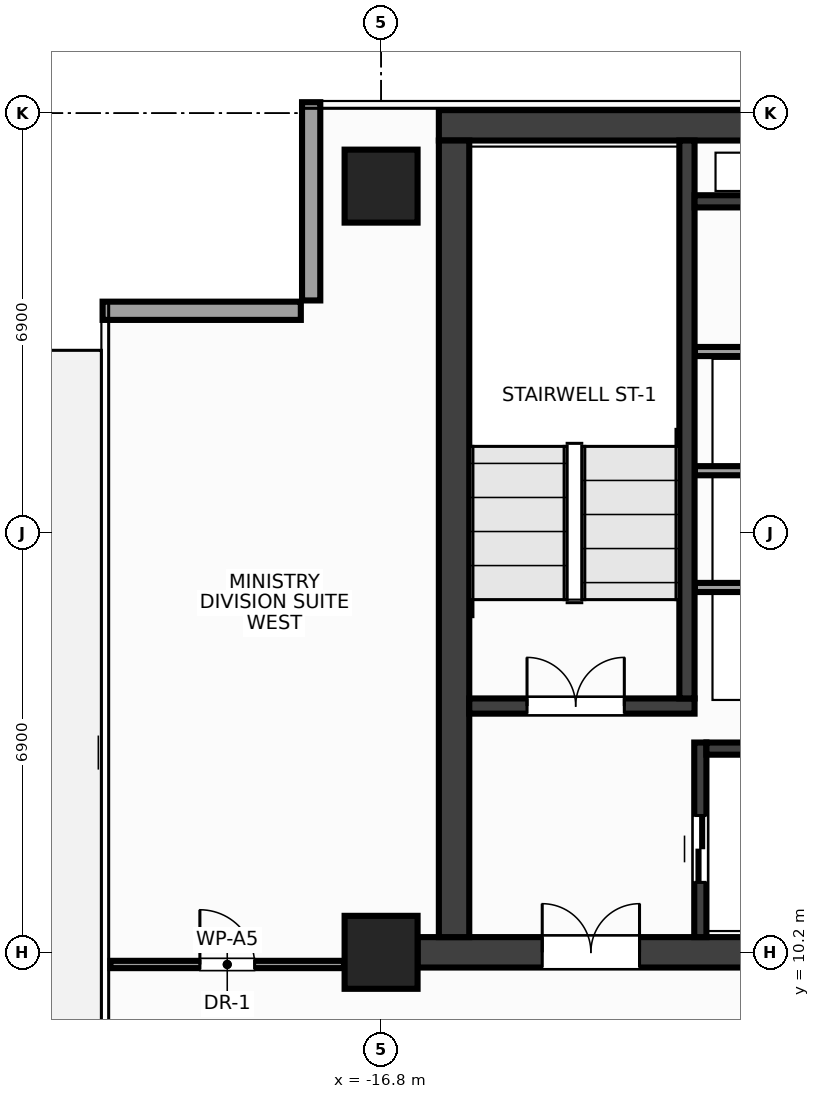
"""IFC4 building model, lengths in metres.
Left out: names, types, materials, properties, quantities, classifications, styles, units other than length and angle.
Written with IfcOpenShell. Run it as: python <this file> out.ifc"""

import sys

from ifc_helpers import new_model, si_unit, direction, frame, frame_2d, origin, origin_2d, place, context, subcontext, project, spatial, rectangle, extrude, source, transform, mapped, element, fill, save


model = new_model("IFC4")
c1 = context("Model", 3, precision=1e-05, world=origin(), true_north=direction((0.0, 1.0)))
c2 = subcontext(c1, "Body", "Model", "MODEL_VIEW")
j1 = project(units=[si_unit("LENGTHUNIT", "METRE"), si_unit("PLANEANGLEUNIT", "RADIAN")], contexts=[c1])
p1 = place(None, origin())
s1 = spatial("IfcSite", under=j1, at=p1, CompositionType="ELEMENT")
p2 = place(p1, origin())
s2 = spatial("IfcBuilding", under=s1, at=p2, CompositionType="ELEMENT")
p3 = place(p2, frame((0.0, 0.0, 272.0)))
s3 = spatial("IfcBuildingStorey", under=s2, at=p3, CompositionType="ELEMENT", Elevation=272.0)
m1 = source(origin(), c2, "Body", "SweptSolid", [
    extrude(rectangle(XDim=31.7, YDim=0.5, at=frame_2d((15.85, 0.0))), origin(), (0.0, 0.0, 1.0), 3.6),
])
p4 = place(p3, frame((-15.85, 23.8, 0.0), z_axis=(0.0, 0.0, 1.0), x_axis=(1.0, 0.0, 0.0)))
e1 = element("IfcWall", 1, at=p4, inside=s3, PredefinedType="SHEAR", context=c2, shape_type="MappedRepresentation", body=[
    mapped(m1, transform((0.0, 0.0, 0.0), x_axis=(1.0, 0.0, 0.0), y_axis=(0.0, 1.0, 0.0), z_axis=(0.0, 0.0, 1.0), scale=1.0)),
])
m2 = source(origin(), c2, "Body", "SweptSolid", [
    extrude(rectangle(XDim=32.4, YDim=0.5, at=frame_2d((16.2, 0.0))), origin(), (0.0, 0.0, 1.0), 3.6),
])
p5 = place(p3, frame((-16.2, 10.2, 0.0), z_axis=(0.0, 0.0, 1.0), x_axis=(1.0, 0.0, 0.0)))
e2 = element("IfcWall", 2, at=p5, inside=s3, PredefinedType="SHEAR", context=c2, shape_type="MappedRepresentation", body=[
    mapped(m2, transform((0.0, 0.0, 0.0), x_axis=(1.0, 0.0, 0.0), y_axis=(0.0, 1.0, 0.0), z_axis=(0.0, 0.0, 1.0), scale=1.0)),
])
p6 = place(p5, frame((2.05, 0.0, 0.0)))
e3 = element("IfcOpeningElement", 3, at=p6, cuts=e2, PredefinedType="OPENING", context=c2, shape_type="SweptSolid", body=[
    extrude(rectangle(XDim=1.6, YDim=2.15, at=frame_2d((0.8, 1.075))), frame((0.0, 0.262, 0.0), z_axis=(0.0, -1.0, 0.0), x_axis=(1.0, 0.0, 0.0)), (0.0, 0.0, 1.0), 0.524),
])
p7 = place(p5, frame((28.75, 0.0, 0.0)))
e4 = element("IfcOpeningElement", 4, at=p7, cuts=e2, PredefinedType="OPENING", context=c2, shape_type="SweptSolid", body=[
    extrude(rectangle(XDim=1.6, YDim=2.15, at=frame_2d((0.8, 1.075))), frame((0.0, 0.262, 0.0), z_axis=(0.0, -1.0, 0.0), x_axis=(1.0, 0.0, 0.0)), (0.0, 0.0, 1.0), 0.524),
])
p8 = place(p5, frame((15.45, 0.0, 0.0)))
e5 = element("IfcOpeningElement", 5, at=p8, cuts=e2, PredefinedType="OPENING", context=c2, shape_type="SweptSolid", body=[
    extrude(rectangle(XDim=1.5, YDim=2.2, at=frame_2d((0.75, 1.1))), frame((0.0, 0.262, 0.0), z_axis=(0.0, -1.0, 0.0), x_axis=(1.0, 0.0, 0.0)), (0.0, 0.0, 1.0), 0.524),
])
m3 = source(origin(), c2, "Body", "SweptSolid", [
    extrude(rectangle(XDim=13.1, YDim=0.5, at=frame_2d((6.55, 0.0))), origin(), (0.0, 0.0, 1.0), 3.6),
])
p9 = place(p3, frame((-15.6, 10.45, 0.0), z_axis=(0.0, 0.0, 1.0), x_axis=(0.0, 1.0, 0.0)))
e6 = element("IfcWall", 6, at=p9, inside=s3, PredefinedType="SHEAR", context=c2, shape_type="MappedRepresentation", body=[
    mapped(m3, transform((0.0, 0.0, 0.0), x_axis=(1.0, 0.0, 0.0), y_axis=(0.0, 1.0, 0.0), z_axis=(0.0, 0.0, 1.0), scale=1.0)),
])
m4 = source(origin(), c2, "Body", "SweptSolid", [
    extrude(rectangle(XDim=3.705, YDim=0.25, at=frame_2d((1.853, 0.0))), origin(), (0.0, 0.0, 1.0), 3.6),
])
p10 = place(p3, frame((-15.35, 14.25, 0.0), z_axis=(0.0, 0.0, 1.0), x_axis=(1.0, 0.0, 0.0)))
e7 = element("IfcWall", 7, at=p10, inside=s3, PredefinedType="SHEAR", context=c2, shape_type="MappedRepresentation", body=[
    mapped(m4, transform((0.0, 0.0, 0.0), x_axis=(1.0, 0.0, 0.0), y_axis=(0.0, 1.0, 0.0), z_axis=(0.0, 0.0, 1.0), scale=1.0)),
])
p11 = place(p10, frame((0.95, 0.0, 0.0)))
e8 = element("IfcOpeningElement", 8, at=p11, cuts=e7, PredefinedType="OPENING", context=c2, shape_type="SweptSolid", body=[
    extrude(rectangle(XDim=1.6, YDim=2.15, at=frame_2d((0.8, 1.075))), frame((0.0, 0.137, 0.0), z_axis=(0.0, -1.0, 0.0), x_axis=(1.0, 0.0, 0.0)), (0.0, 0.0, 1.0), 0.274),
])
m5 = source(origin(), c2, "Body", "SweptSolid", [
    extrude(rectangle(XDim=9.175, YDim=0.25, at=frame_2d((4.587, 0.0))), origin(), (0.0, 0.0, 1.0), 3.6),
])
p12 = place(p3, frame((-11.77, 14.375, 0.0), z_axis=(0.0, 0.0, 1.0), x_axis=(0.0, 1.0, 0.0)))
e9 = element("IfcWall", 9, at=p12, inside=s3, PredefinedType="SHEAR", context=c2, shape_type="MappedRepresentation", body=[
    mapped(m5, transform((0.0, 0.0, 0.0), x_axis=(1.0, 0.0, 0.0), y_axis=(0.0, 1.0, 0.0), z_axis=(0.0, 0.0, 1.0), scale=1.0)),
])
m6 = source(origin(), c2, "Body", "SweptSolid", [
    extrude(rectangle(XDim=3.2, YDim=0.2, at=frame_2d((1.6, 0.0))), origin(), (0.0, 0.0, 1.0), 3.6),
])
p13 = place(p3, frame((-11.55, 10.45, 0.0), z_axis=(0.0, 0.0, 1.0), x_axis=(0.0, 1.0, 0.0)))
e10 = element("IfcWall", 10, at=p13, inside=s3, PredefinedType="SHEAR", context=c2, shape_type="MappedRepresentation", body=[
    mapped(m6, transform((0.0, 0.0, 0.0), x_axis=(1.0, 0.0, 0.0), y_axis=(0.0, 1.0, 0.0), z_axis=(0.0, 0.0, 1.0), scale=1.0)),
])
p14 = place(p13, frame((0.9, 0.0, 0.0)))
e11 = element("IfcOpeningElement", 11, at=p14, cuts=e10, PredefinedType="OPENING", context=c2, shape_type="SweptSolid", body=[
    extrude(rectangle(XDim=1.1, YDim=2.15, at=frame_2d((0.55, 1.075))), frame((0.0, 0.112, 0.0), z_axis=(0.0, -1.0, 0.0), x_axis=(1.0, 0.0, 0.0)), (0.0, 0.0, 1.0), 0.224),
])
m7 = source(origin(), c2, "Body", "SweptSolid", [
    extrude(rectangle(XDim=2.825, YDim=0.2, at=frame_2d((1.413, 0.0))), origin(), (0.0, 0.0, 1.0), 3.6),
])
p15 = place(p3, frame((-11.45, 13.55, 0.0), z_axis=(0.0, 0.0, 1.0), x_axis=(1.0, 0.0, 0.0)))
e12 = element("IfcWall", 12, at=p15, inside=s3, PredefinedType="SHEAR", context=c2, shape_type="MappedRepresentation", body=[
    mapped(m7, transform((0.0, 0.0, 0.0), x_axis=(1.0, 0.0, 0.0), y_axis=(0.0, 1.0, 0.0), z_axis=(0.0, 0.0, 1.0), scale=1.0)),
])
m8 = source(origin(), c2, "Body", "SweptSolid", [
    extrude(rectangle(XDim=3.02, YDim=0.2, at=frame_2d((1.51, 0.0))), origin(), (0.0, 0.0, 1.0), 3.6),
])
p16 = place(p3, frame((-11.645, 22.55, 0.0), z_axis=(0.0, 0.0, 1.0), x_axis=(1.0, 0.0, 0.0)))
e13 = element("IfcWall", 13, at=p16, inside=s3, PredefinedType="SHEAR", context=c2, shape_type="MappedRepresentation", body=[
    mapped(m8, transform((0.0, 0.0, 0.0), x_axis=(1.0, 0.0, 0.0), y_axis=(0.0, 1.0, 0.0), z_axis=(0.0, 0.0, 1.0), scale=1.0)),
])
m9 = source(origin(), c2, "Body", "SweptSolid", [
    extrude(rectangle(XDim=1.2, YDim=1.2, at=origin_2d()), origin(), (0.0, 0.0, 1.0), 3.6),
])
for number, where, z_axis, x_axis in (
    (14, (-16.8, 10.2, 0.0), (0.0, 0.0, 1.0), (1.0, 0.0, 0.0)),
    (15, (-16.8, 22.8, 0.0), (0.0, 0.0, 1.0), (1.0, 0.0, 0.0)),
):
    element("IfcColumn", number, at=place(p3, frame(where, z_axis=z_axis, x_axis=x_axis)), inside=s3, PredefinedType="COLUMN", context=c2, shape_type="MappedRepresentation", body=[
        mapped(m9, transform((0.0, 0.0, 0.0), x_axis=(1.0, 0.0, 0.0), y_axis=(0.0, 1.0, 0.0), z_axis=(0.0, 0.0, 1.0), scale=1.0)),
    ])
m10 = source(origin(), c2, "Body", "SweptSolid", [
    extrude(rectangle(XDim=3.26, YDim=0.3, at=frame_2d((1.63, 0.0))), origin(), (0.0, 0.0, 1.0), 2.75),
])
p17 = place(p3, frame((-17.95, 24.18, 0.0), z_axis=(0.0, 0.0, 1.0), x_axis=(0.0, -1.0, 0.0)))
e16 = element("IfcWall", 16, at=p17, inside=s3, PredefinedType="STANDARD", context=c2, shape_type="MappedRepresentation", body=[
    mapped(m10, transform((0.0, 0.0, 0.0), x_axis=(1.0, 0.0, 0.0), y_axis=(0.0, 1.0, 0.0), z_axis=(0.0, 0.0, 1.0), scale=1.0)),
])
m11 = source(origin(), c2, "Body", "SweptSolid", [
    extrude(rectangle(XDim=3.26, YDim=0.3, at=frame_2d((1.63, 0.0))), origin(), (0.0, 0.0, 1.0), 2.75),
])
p18 = place(p3, frame((-18.12, 20.75, 0.0), z_axis=(0.0, 0.0, 1.0), x_axis=(-1.0, 0.0, 0.0)))
e17 = element("IfcWall", 17, at=p18, inside=s3, PredefinedType="STANDARD", context=c2, shape_type="MappedRepresentation", body=[
    mapped(m11, transform((0.0, 0.0, 0.0), x_axis=(1.0, 0.0, 0.0), y_axis=(0.0, 1.0, 0.0), z_axis=(0.0, 0.0, 1.0), scale=1.0)),
])
m12 = source(origin(), c2, "Body", "SweptSolid", [
    extrude(rectangle(XDim=3.01, YDim=0.15, at=frame_2d((1.505, 0.0))), origin(), (0.0, 0.0, 1.0), 3.37),
])
for number, where, z_axis, x_axis in (
    (18, (-11.64, 16.2, 0.0), (0.0, 0.0, 1.0), (1.0, 0.0, 0.0)),
    (19, (-11.64, 18.12, 0.0), (0.0, 0.0, 1.0), (1.0, 0.0, 0.0)),
    (20, (-11.64, 20.08, 0.0), (0.0, 0.0, 1.0), (1.0, 0.0, 0.0)),
):
    element("IfcWall", number, at=place(p3, frame(where, z_axis=z_axis, x_axis=x_axis)), inside=s3, PredefinedType="PARTITIONING", context=c2, shape_type="MappedRepresentation", body=[
        mapped(m12, transform((0.0, 0.0, 0.0), x_axis=(1.0, 0.0, 0.0), y_axis=(0.0, 1.0, 0.0), z_axis=(0.0, 0.0, 1.0), scale=1.0)),
    ])
m13 = source(origin(), c2, "Body", "SweptSolid", [
    extrude(rectangle(XDim=3.84, YDim=0.12, at=frame_2d((1.92, 0.0))), origin(), (0.0, 0.0, 1.0), 2.805),
])
p19 = place(p3, frame((-21.25, 10.0, 0.0), z_axis=(0.0, 0.0, 1.0), x_axis=(1.0, 0.0, 0.0)))
e21 = element("IfcWall", 21, at=p19, inside=s3, PredefinedType="PARTITIONING", context=c2, shape_type="MappedRepresentation", body=[
    mapped(m13, transform((0.0, 0.0, 0.0), x_axis=(1.0, 0.0, 0.0), y_axis=(0.0, 1.0, 0.0), z_axis=(0.0, 0.0, 1.0), scale=1.0)),
])
p20 = place(p19, frame((1.47, 0.0, 0.0)))
e22 = element("IfcOpeningElement", 22, at=p20, cuts=e21, PredefinedType="OPENING", context=c2, shape_type="SweptSolid", body=[
    extrude(rectangle(XDim=0.9, YDim=2.15, at=frame_2d((0.45, 1.075))), frame((0.0, 0.072, 0.0), z_axis=(0.0, -1.0, 0.0), x_axis=(1.0, 0.0, 0.0)), (0.0, 0.0, 1.0), 0.144),
])
m14 = source(origin(), c2, "Body", "SweptSolid", [
    extrude(rectangle(XDim=1.6, YDim=2.15, at=frame_2d((0.8, 1.075))), frame((0.0, 0.025, 0.0), z_axis=(0.0, -1.0, 0.0), x_axis=(1.0, 0.0, 0.0)), (0.0, 0.0, 1.0), 0.05),
])
p21 = place(p11, origin())
e23 = element("IfcDoor", 23, at=p21, inside=s3, OperationType="DOUBLE_DOOR_SINGLE_SWING", PredefinedType="DOOR", context=c2, shape_type="MappedRepresentation", body=[
    mapped(m14, transform((0.0, 0.0, 0.0), x_axis=(1.0, 0.0, 0.0), y_axis=(0.0, 1.0, 0.0), z_axis=(0.0, 0.0, 1.0), scale=1.0)),
])
fill(e8, e23)
p22 = place(p6, origin())
e24 = element("IfcDoor", 24, at=p22, inside=s3, OperationType="DOUBLE_DOOR_SINGLE_SWING", PredefinedType="DOOR", context=c2, shape_type="MappedRepresentation", body=[
    mapped(m14, transform((0.0, 0.0, 0.0), x_axis=(1.0, 0.0, 0.0), y_axis=(0.0, 1.0, 0.0), z_axis=(0.0, 0.0, 1.0), scale=1.0)),
])
fill(e3, e24)
m15 = source(origin(), c2, "Body", "SweptSolid", [
    extrude(rectangle(XDim=1.1, YDim=2.15, at=frame_2d((0.55, 1.075))), frame((0.0, 0.025, 0.0), z_axis=(0.0, -1.0, 0.0), x_axis=(1.0, 0.0, 0.0)), (0.0, 0.0, 1.0), 0.05),
])
p23 = place(p14, origin())
e25 = element("IfcDoor", 25, at=p23, inside=s3, OperationType="DOUBLE_DOOR_SLIDING", PredefinedType="DOOR", context=c2, shape_type="MappedRepresentation", body=[
    mapped(m15, transform((0.0, 0.0, 0.0), x_axis=(1.0, 0.0, 0.0), y_axis=(0.0, 1.0, 0.0), z_axis=(0.0, 0.0, 1.0), scale=1.0)),
])
fill(e11, e25)
m16 = source(origin(), c2, "Body", "SweptSolid", [
    extrude(rectangle(XDim=0.9, YDim=2.15, at=frame_2d((0.45, 1.075))), frame((0.0, 0.025, 0.0), z_axis=(0.0, -1.0, 0.0), x_axis=(1.0, 0.0, 0.0)), (0.0, 0.0, 1.0), 0.05),
])
p24 = place(p20, origin())
e26 = element("IfcDoor", 26, at=p24, inside=s3, OperationType="SINGLE_SWING_LEFT", PredefinedType="DOOR", context=c2, shape_type="MappedRepresentation", body=[
    mapped(m16, transform((0.0, 0.0, 0.0), x_axis=(1.0, 0.0, 0.0), y_axis=(0.0, 1.0, 0.0), z_axis=(0.0, 0.0, 1.0), scale=1.0)),
])
fill(e22, e26)
save(model, sys.argv[1])
